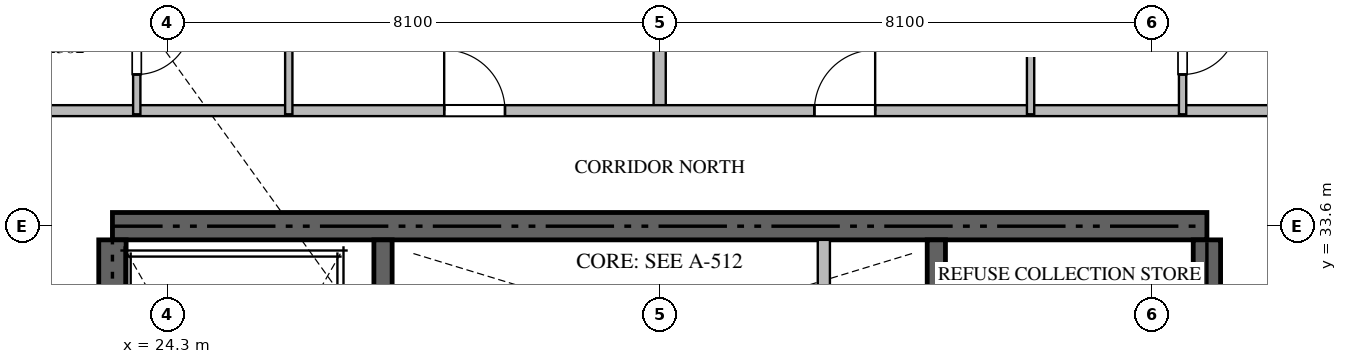
"""IFC4 building model, lengths in metres.
Left out: names, types, materials, properties, quantities, classifications, styles, units other than length and angle.
Written with IfcOpenShell. Run it as: python <this file> out.ifc"""

import sys

from ifc_helpers import new_model, si_unit, direction, frame, frame_2d, origin, place, context, subcontext, project, spatial, rectangle, extrude, source, transform, mapped, element, fill, save


model = new_model("IFC4")
c1 = context("Model", 3, precision=1e-05, world=origin(), true_north=direction((0.0, 1.0)))
c2 = subcontext(c1, "Body", "Model", "MODEL_VIEW")
j1 = project(units=[si_unit("LENGTHUNIT", "METRE"), si_unit("PLANEANGLEUNIT", "RADIAN")], contexts=[c1])
p1 = place(None, origin())
s1 = spatial("IfcSite", under=j1, at=p1, CompositionType="ELEMENT")
p2 = place(p1, origin())
s2 = spatial("IfcBuilding", under=s1, at=p2, CompositionType="ELEMENT")
p3 = place(p2, frame((0.0, 0.0, 94.2)))
s3 = spatial("IfcBuildingStorey", under=s2, at=p3, CompositionType="ELEMENT", Elevation=94.2)
p4 = place(p3, frame((41.4, 33.6, -0.26), z_axis=(0.0, 0.0, 1.0), x_axis=(-1.0, 0.0, 0.0)))
e1 = element("IfcWall", 1, at=p4, inside=s3, PredefinedType="SHEAR", context=c2, shape_type="SweptSolid", body=[
    extrude(rectangle(XDim=18.0, YDim=0.45, at=frame_2d((9.0, 0.0))), origin(), (0.0, 0.0, 1.0), 3.748),
])
p5 = place(p3, frame((23.4, 24.25, -0.26), z_axis=(0.0, 0.0, 1.0), x_axis=(0.0, 1.0, 0.0)))
e2 = element("IfcWall", 2, at=p5, inside=s3, PredefinedType="SHEAR", context=c2, shape_type="SweptSolid", body=[
    extrude(rectangle(XDim=9.125, YDim=0.45, at=frame_2d((4.562, 0.0))), origin(), (0.0, 0.0, 1.0), 3.748),
])
p6 = place(p3, frame((41.4, 27.75, -0.26), z_axis=(0.0, 0.0, 1.0), x_axis=(0.0, 1.0, 0.0)))
e3 = element("IfcWall", 3, at=p6, inside=s3, PredefinedType="SHEAR", context=c2, shape_type="SweptSolid", body=[
    extrude(rectangle(XDim=5.625, YDim=0.45, at=frame_2d((2.812, 0.0))), origin(), (0.0, 0.0, 1.0), 3.748),
])
p7 = place(p3, frame((27.85, 23.55, -0.26), z_axis=(0.0, 0.0, 1.0), x_axis=(0.0, 1.0, 0.0)))
e4 = element("IfcWall", 4, at=p7, inside=s3, PredefinedType="SHEAR", context=c2, shape_type="SweptSolid", body=[
    extrude(rectangle(XDim=9.825, YDim=0.3, at=frame_2d((4.913, 0.0))), origin(), (0.0, 0.0, 1.0), 3.748),
])
p8 = place(p3, frame((36.95, 27.05, -0.26), z_axis=(0.0, 0.0, 1.0), x_axis=(0.0, 1.0, 0.0)))
e5 = element("IfcWall", 5, at=p8, inside=s3, PredefinedType="SHEAR", context=c2, shape_type="SweptSolid", body=[
    extrude(rectangle(XDim=6.325, YDim=0.3, at=frame_2d((3.163, 0.0))), origin(), (0.0, 0.0, 1.0), 3.748),
])
p9 = place(p3, frame((35.1, 30.75, 0.0), z_axis=(0.0, 0.0, 1.0), x_axis=(0.0, 1.0, 0.0)))
e6 = element("IfcWall", 6, at=p9, inside=s3, PredefinedType="STANDARD", context=c2, shape_type="SweptSolid", body=[
    extrude(rectangle(XDim=2.625, YDim=0.2, at=frame_2d((1.312, 0.0))), origin(), (0.0, 0.0, 1.0), 3.49),
])
p10 = place(p3, frame((32.4, 35.5, 0.0), z_axis=(0.0, 0.0, 1.0), x_axis=(0.0, 1.0, 0.0)))
e7 = element("IfcWall", 7, at=p10, inside=s3, PredefinedType="PARTITIONING", context=c2, shape_type="SweptSolid", body=[
    extrude(rectangle(XDim=14.618, YDim=0.2, at=frame_2d((7.309, 0.0))), origin(), (0.0, 0.0, 1.0), 3.49),
])
p11 = place(p3, frame((21.402, 35.5, 0.0), z_axis=(0.0, 0.0, 1.0), x_axis=(1.0, 0.0, 0.0)))
e8 = element("IfcWall", 8, at=p11, inside=s3, PredefinedType="PARTITIONING", context=c2, shape_type="SweptSolid", body=[
    extrude(rectangle(XDim=21.996, YDim=0.18, at=frame_2d((10.998, 0.0))), origin(), (0.0, 0.0, 1.0), 3.49),
])
p12 = place(p11, frame((7.454, 0.0, 0.0)))
e9 = element("IfcOpeningElement", 9, at=p12, cuts=e8, PredefinedType="OPENING", context=c2, shape_type="SweptSolid", body=[
    extrude(rectangle(XDim=1.0, YDim=2.15, at=frame_2d((0.5, 1.075))), frame((0.0, 0.1, 0.0), z_axis=(0.0, -1.0, 0.0), x_axis=(1.0, 0.0, 0.0)), (0.0, 0.0, 1.0), 0.2),
])
p13 = place(p11, frame((13.542, 0.0, 0.0)))
e10 = element("IfcOpeningElement", 10, at=p13, cuts=e8, PredefinedType="OPENING", context=c2, shape_type="SweptSolid", body=[
    extrude(rectangle(XDim=1.0, YDim=2.15, at=frame_2d((0.5, 1.075))), frame((0.0, 0.1, 0.0), z_axis=(0.0, -1.0, 0.0), x_axis=(1.0, 0.0, 0.0)), (0.0, 0.0, 1.0), 0.2),
])
p14 = place(p3, frame((26.3, 38.25, 0.0), z_axis=(0.0, 0.0, 1.0), x_axis=(0.0, -1.0, 0.0)))
e11 = element("IfcWall", 11, at=p14, inside=s3, PredefinedType="PARTITIONING", context=c2, shape_type="SweptSolid", body=[
    extrude(rectangle(XDim=2.81, YDim=0.12, at=frame_2d((1.405, 0.0))), origin(), (0.0, 0.0, 1.0), 3.49),
])
p15 = place(p3, frame((23.8, 37.65, 0.0), z_axis=(0.0, 0.0, 1.0), x_axis=(0.0, -1.0, 0.0)))
e12 = element("IfcWall", 12, at=p15, inside=s3, PredefinedType="PARTITIONING", context=c2, shape_type="SweptSolid", body=[
    extrude(rectangle(XDim=2.21, YDim=0.12, at=frame_2d((1.105, 0.0))), origin(), (0.0, 0.0, 1.0), 3.49),
])
p16 = place(p15, frame((0.655, 0.0, 0.0)))
e13 = element("IfcOpeningElement", 13, at=p16, cuts=e12, PredefinedType="OPENING", context=c2, shape_type="SweptSolid", body=[
    extrude(rectangle(XDim=0.9, YDim=2.1, at=frame_2d((0.45, 1.05))), frame((0.0, 0.07, 0.0), z_axis=(0.0, -1.0, 0.0), x_axis=(1.0, 0.0, 0.0)), (0.0, 0.0, 1.0), 0.14),
])
p17 = place(p3, frame((38.5, 38.25, 0.0), z_axis=(0.0, 0.0, 1.0), x_axis=(0.0, -1.0, 0.0)))
e14 = element("IfcWall", 14, at=p17, inside=s3, PredefinedType="PARTITIONING", context=c2, shape_type="SweptSolid", body=[
    extrude(rectangle(XDim=2.81, YDim=0.12, at=frame_2d((1.405, 0.0))), origin(), (0.0, 0.0, 1.0), 3.49),
])
p18 = place(p3, frame((41.0, 37.65, 0.0), z_axis=(0.0, 0.0, 1.0), x_axis=(0.0, -1.0, 0.0)))
e15 = element("IfcWall", 15, at=p18, inside=s3, PredefinedType="PARTITIONING", context=c2, shape_type="SweptSolid", body=[
    extrude(rectangle(XDim=2.21, YDim=0.12, at=frame_2d((1.105, 0.0))), origin(), (0.0, 0.0, 1.0), 3.49),
])
p19 = place(p18, frame((0.655, 0.0, 0.0)))
e16 = element("IfcOpeningElement", 16, at=p19, cuts=e15, PredefinedType="OPENING", context=c2, shape_type="SweptSolid", body=[
    extrude(rectangle(XDim=0.9, YDim=2.1, at=frame_2d((0.45, 1.05))), frame((0.0, 0.07, 0.0), z_axis=(0.0, -1.0, 0.0), x_axis=(1.0, 0.0, 0.0)), (0.0, 0.0, 1.0), 0.14),
])
m1 = source(origin(), c2, "Body", "SweptSolid", [
    extrude(rectangle(XDim=1.0, YDim=2.15, at=frame_2d((0.5, 1.075))), frame((0.0, 0.025, 0.0), z_axis=(0.0, -1.0, 0.0), x_axis=(1.0, 0.0, 0.0)), (0.0, 0.0, 1.0), 0.05),
])
p20 = place(p12, origin())
e17 = element("IfcDoor", 17, at=p20, inside=s3, OperationType="SINGLE_SWING_LEFT", PredefinedType="DOOR", context=c2, shape_type="MappedRepresentation", body=[
    mapped(m1, transform((0.0, 0.0, 0.0), scale=1.0)),
])
fill(e9, e17)
p21 = place(p13, origin())
e18 = element("IfcDoor", 18, at=p21, inside=s3, OperationType="SINGLE_SWING_RIGHT", PredefinedType="DOOR", context=c2, shape_type="MappedRepresentation", body=[
    mapped(m1, transform((0.0, 0.0, 0.0), scale=1.0)),
])
fill(e10, e18)
m2 = source(origin(), c2, "Body", "SweptSolid", [
    extrude(rectangle(XDim=0.9, YDim=2.1, at=frame_2d((0.45, 1.05))), frame((0.0, 0.025, 0.0), z_axis=(0.0, -1.0, 0.0), x_axis=(1.0, 0.0, 0.0)), (0.0, 0.0, 1.0), 0.05),
])
p22 = place(p16, origin())
e19 = element("IfcDoor", 19, at=p22, inside=s3, OperationType="SINGLE_SWING_LEFT", PredefinedType="DOOR", context=c2, shape_type="MappedRepresentation", body=[
    mapped(m2, transform((0.0, 0.0, 0.0), scale=1.0)),
])
fill(e13, e19)
p23 = place(p19, origin())
e20 = element("IfcDoor", 20, at=p23, inside=s3, OperationType="SINGLE_SWING_LEFT", PredefinedType="DOOR", context=c2, shape_type="MappedRepresentation", body=[
    mapped(m2, transform((0.0, 0.0, 0.0), scale=1.0)),
])
fill(e16, e20)
save(model, sys.argv[1])
